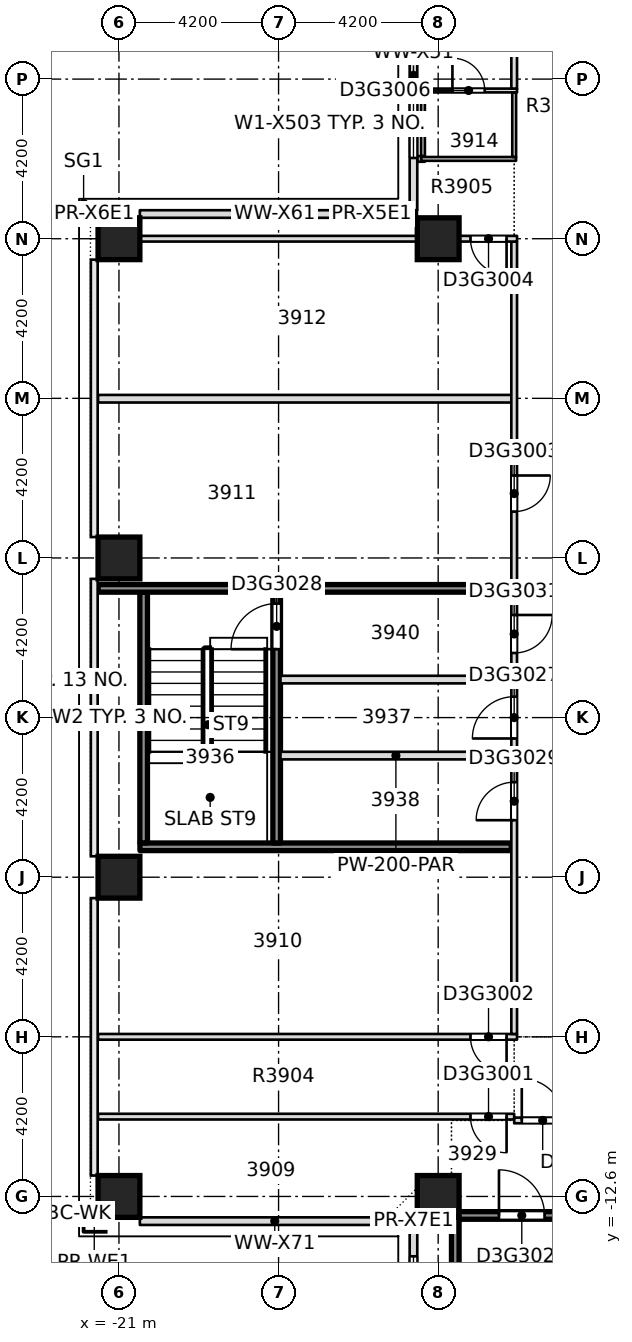
"""IFC4 building model, lengths in metres.
Left out: names, types, materials, properties, quantities, classifications, styles, units other than length and angle.
Written with IfcOpenShell. Run it as: python <this file> out.ifc"""

import sys

from ifc_helpers import new_model, si_unit, direction, frame, frame_2d, origin, origin_2d, place, context, subcontext, project, spatial, rectangle, extrude, element, fill, save


model = new_model("IFC4")
c1 = context("Model", 3, precision=1e-05, world=origin(), true_north=direction((0.0, 1.0)))
c2 = subcontext(c1, "Body", "Model", "MODEL_VIEW")
j1 = project(units=[si_unit("LENGTHUNIT", "METRE"), si_unit("PLANEANGLEUNIT", "RADIAN")], contexts=[c1])
p1 = place(None, origin())
s1 = spatial("IfcSite", under=j1, at=p1, CompositionType="ELEMENT")
p2 = place(p1, origin())
s2 = spatial("IfcBuilding", under=s1, at=p2, CompositionType="ELEMENT")
p3 = place(p2, frame((0.0, 0.0, 153.8)))
s3 = spatial("IfcBuildingStorey", under=s2, at=p3, CompositionType="ELEMENT", Elevation=153.8)
for number, where, z_axis, x_axis in (
    (1, (-21.0, -12.6, -0.4), (0.0, 0.0, 1.0), (1.0, 0.0, 0.0)),
    (2, (-12.6, -12.6, -0.4), (0.0, 0.0, 1.0), (1.0, 0.0, 0.0)),
    (3, (-21.0, -4.2, -0.4), (0.0, 0.0, 1.0), (1.0, 0.0, 0.0)),
    (4, (-21.0, 4.2, -0.4), (0.0, 0.0, 1.0), (1.0, 0.0, 0.0)),
    (5, (-21.0, 12.6, -0.4), (0.0, 0.0, 1.0), (1.0, 0.0, 0.0)),
    (6, (-12.6, 12.6, -0.4), (0.0, 0.0, 1.0), (1.0, 0.0, 0.0)),
):
    element("IfcColumn", number, at=place(p3, frame(where, z_axis=z_axis, x_axis=x_axis)), inside=s3, PredefinedType="COLUMN", context=c2, shape_type="SweptSolid", body=[
        extrude(rectangle(XDim=1.1, YDim=1.1, at=origin_2d()), origin(), (0.0, 0.0, 1.0), 3.45),
    ])
p4 = place(p3, frame((-12.15, -13.1, 0.0), z_axis=(0.0, 0.0, 1.0), x_axis=(1.0, 0.0, 0.0)))
e7 = element("IfcWall", 7, at=p4, inside=s3, PredefinedType="SOLIDWALL", context=c2, shape_type="SweptSolid", body=[
    extrude(rectangle(XDim=3.498, YDim=0.2, at=frame_2d((1.749, 0.0))), origin(), (0.0, 0.0, 1.0), 3.05),
])
p5 = place(p4, frame((1.15, 0.0, 0.0)))
e8 = element("IfcOpeningElement", 8, at=p5, cuts=e7, PredefinedType="OPENING", context=c2, shape_type="SweptSolid", body=[
    extrude(rectangle(XDim=1.2, YDim=2.1, at=frame_2d((0.6, 1.05))), frame((0.0, 0.11, 0.0), z_axis=(0.0, -1.0, 0.0), x_axis=(1.0, 0.0, 0.0)), (0.0, 0.0, 1.0), 0.22),
])
p6 = place(p3, frame((-10.6, -10.6, 0.0), z_axis=(0.0, 0.0, 1.0), x_axis=(1.0, 0.0, 0.0)))
e9 = element("IfcWall", 9, at=p6, inside=s3, PredefinedType="PARTITIONING", context=c2, shape_type="SweptSolid", body=[
    extrude(rectangle(XDim=6.1, YDim=0.15, at=frame_2d((3.05, 0.0))), origin(), (0.0, 0.0, 1.0), 3.05),
])
p7 = place(p6, frame((3.575, 0.0, 0.0)))
e10 = element("IfcOpeningElement", 10, at=p7, cuts=e9, PredefinedType="OPENING", context=c2, shape_type="SweptSolid", body=[
    extrude(rectangle(XDim=0.95, YDim=2.1, at=frame_2d((0.475, 1.05))), frame((0.0, 0.085, 0.0), z_axis=(0.0, -1.0, 0.0), x_axis=(1.0, 0.0, 0.0)), (0.0, 0.0, 1.0), 0.17),
])
p8 = place(p6, frame((0.2, 0.0, 0.0)))
e11 = element("IfcOpeningElement", 11, at=p8, cuts=e9, PredefinedType="OPENING", context=c2, shape_type="SweptSolid", body=[
    extrude(rectangle(XDim=1.1, YDim=2.1, at=frame_2d((0.55, 1.05))), frame((0.0, 0.085, 0.0), z_axis=(0.0, -1.0, 0.0), x_axis=(1.0, 0.0, 0.0)), (0.0, 0.0, 1.0), 0.17),
])
p9 = place(p3, frame((-21.55, -10.5, 0.0), z_axis=(0.0, 0.0, 1.0), x_axis=(1.0, 0.0, 0.0)))
e12 = element("IfcWall", 12, at=p9, inside=s3, PredefinedType="PARTITIONING", context=c2, shape_type="SweptSolid", body=[
    extrude(rectangle(XDim=10.95, YDim=0.15, at=frame_2d((5.475, 0.0))), origin(), (0.0, 0.0, 1.0), 3.05),
])
p10 = place(p9, frame((9.8, 0.0, 0.0)))
e13 = element("IfcOpeningElement", 13, at=p10, cuts=e12, PredefinedType="OPENING", context=c2, shape_type="SweptSolid", body=[
    extrude(rectangle(XDim=0.95, YDim=2.1, at=frame_2d((0.475, 1.05))), frame((0.0, 0.085, 0.0), z_axis=(0.0, -1.0, 0.0), x_axis=(1.0, 0.0, 0.0)), (0.0, 0.0, 1.0), 0.17),
])
p11 = place(p3, frame((-21.55, -8.4, 0.0), z_axis=(0.0, 0.0, 1.0), x_axis=(1.0, 0.0, 0.0)))
e14 = element("IfcWall", 14, at=p11, inside=s3, PredefinedType="PARTITIONING", context=c2, shape_type="SweptSolid", body=[
    extrude(rectangle(XDim=11.025, YDim=0.15, at=frame_2d((5.513, 0.0))), origin(), (0.0, 0.0, 1.0), 3.05),
])
p12 = place(p11, frame((9.8, 0.0, 0.0)))
e15 = element("IfcOpeningElement", 15, at=p12, cuts=e14, PredefinedType="OPENING", context=c2, shape_type="SweptSolid", body=[
    extrude(rectangle(XDim=0.95, YDim=2.1, at=frame_2d((0.475, 1.05))), frame((0.0, 0.085, 0.0), z_axis=(0.0, -1.0, 0.0), x_axis=(1.0, 0.0, 0.0)), (0.0, 0.0, 1.0), 0.17),
])
p13 = place(p3, frame((-20.448, -3.4, 0.0), z_axis=(0.0, 0.0, 1.0), x_axis=(1.0, 0.0, 0.0)))
e16 = element("IfcWall", 16, at=p13, inside=s3, PredefinedType="SOLIDWALL", context=c2, shape_type="SweptSolid", body=[
    extrude(rectangle(XDim=9.773, YDim=0.2, at=frame_2d((4.886, 0.0))), origin(), (0.0, 0.0, 1.0), 3.05),
])
for number, where, z_axis, x_axis in (
    (17, (-16.75, -1.0, 0.0), (0.0, 0.0, 1.0), (1.0, 0.0, 0.0)),
    (18, (-16.75, 1.0, 0.0), (0.0, 0.0, 1.0), (1.0, 0.0, 0.0)),
):
    element("IfcWall", number, at=place(p3, frame(where, z_axis=z_axis, x_axis=x_axis)), inside=s3, PredefinedType="PARTITIONING", context=c2, shape_type="SweptSolid", body=[
        extrude(rectangle(XDim=6.075, YDim=0.2, at=frame_2d((3.038, 0.0))), origin(), (0.0, 0.0, 1.0), 3.05),
    ])
p14 = place(p3, frame((-21.55, 8.39, 0.0), z_axis=(0.0, 0.0, 1.0), x_axis=(1.0, 0.0, 0.0)))
e19 = element("IfcWall", 19, at=p14, inside=s3, PredefinedType="PARTITIONING", context=c2, shape_type="SweptSolid", body=[
    extrude(rectangle(XDim=10.875, YDim=0.2, at=frame_2d((5.438, 0.0))), origin(), (0.0, 0.0, 1.0), 3.05),
])
p15 = place(p3, frame((-21.55, 12.6, 0.0), z_axis=(0.0, 0.0, 1.0), x_axis=(1.0, 0.0, 0.0)))
e20 = element("IfcWall", 20, at=p15, inside=s3, PredefinedType="PARTITIONING", context=c2, shape_type="SweptSolid", body=[
    extrude(rectangle(XDim=1.1, YDim=0.15, at=frame_2d((0.55, 0.0))), origin(), (0.0, 0.0, 1.0), 3.05),
])
p16 = place(p3, frame((-13.15, 14.7, 0.0), z_axis=(0.0, 0.0, 1.0), x_axis=(1.0, 0.0, 0.0)))
e21 = element("IfcWall", 21, at=p16, inside=s3, PredefinedType="PARTITIONING", context=c2, shape_type="SweptSolid", body=[
    extrude(rectangle(XDim=0.2, YDim=0.15, at=frame_2d((0.1, 0.0))), origin(), (0.0, 0.0, 1.0), 3.05),
])
p17 = place(p3, frame((-13.05, 14.7, 0.0), z_axis=(0.0, 0.0, 1.0), x_axis=(1.0, 0.0, 0.0)))
e22 = element("IfcWall", 22, at=p17, inside=s3, PredefinedType="PARTITIONING", context=c2, shape_type="SweptSolid", body=[
    extrude(rectangle(XDim=2.5, YDim=0.1, at=frame_2d((1.25, 0.0))), origin(), (0.0, 0.0, 1.0), 3.05),
])
p18 = place(p3, frame((-13.05, 16.5, 0.0), z_axis=(0.0, 0.0, 1.0), x_axis=(1.0, 0.0, 0.0)))
e23 = element("IfcWall", 23, at=p18, inside=s3, PredefinedType="PARTITIONING", context=c2, shape_type="SweptSolid", body=[
    extrude(rectangle(XDim=2.525, YDim=0.1, at=frame_2d((1.263, 0.0))), origin(), (0.0, 0.0, 1.0), 3.05),
])
p19 = place(p18, frame((0.825, 0.0, 0.0)))
e24 = element("IfcOpeningElement", 24, at=p19, cuts=e23, PredefinedType="OPENING", context=c2, shape_type="SweptSolid", body=[
    extrude(rectangle(XDim=0.85, YDim=2.1, at=frame_2d((0.425, 1.05))), frame((0.0, 0.06, 0.0), z_axis=(0.0, -1.0, 0.0), x_axis=(1.0, 0.0, 0.0)), (0.0, 0.0, 1.0), 0.12),
])
p20 = place(p3, frame((-20.35, -3.298, 0.0), z_axis=(0.0, 0.0, 1.0), x_axis=(0.0, 1.0, 0.0)))
e25 = element("IfcWall", 25, at=p20, inside=s3, PredefinedType="SOLIDWALL", context=c2, shape_type="SweptSolid", body=[
    extrude(rectangle(XDim=6.596, YDim=0.2, at=frame_2d((3.298, 0.0))), origin(), (0.0, 0.0, 1.0), 3.05),
])
p21 = place(p3, frame((-16.85, -3.3, 0.0), z_axis=(0.0, 0.0, 1.0), x_axis=(0.0, 1.0, 0.0)))
e26 = element("IfcWall", 26, at=p21, inside=s3, PredefinedType="SOLIDWALL", context=c2, shape_type="SweptSolid", body=[
    extrude(rectangle(XDim=6.6, YDim=0.2, at=frame_2d((3.3, 0.0))), origin(), (0.0, 0.0, 1.0), 3.05),
])
p22 = place(p21, frame((5.1, 0.0, 0.0)))
e27 = element("IfcOpeningElement", 27, at=p22, cuts=e26, PredefinedType="OPENING", context=c2, shape_type="SweptSolid", body=[
    extrude(rectangle(XDim=1.2, YDim=2.1, at=frame_2d((0.6, 1.05))), frame((0.0, 0.11, 0.0), z_axis=(0.0, -1.0, 0.0), x_axis=(1.0, 0.0, 0.0)), (0.0, 0.0, 1.0), 0.22),
])
p23 = place(p3, frame((-13.0, 14.775, 0.0), z_axis=(0.0, 0.0, 1.0), x_axis=(0.0, 1.0, 0.0)))
e28 = element("IfcWall", 28, at=p23, inside=s3, PredefinedType="PARTITIONING", context=c2, shape_type="SweptSolid", body=[
    extrude(rectangle(XDim=1.675, YDim=0.1, at=frame_2d((0.837, 0.0))), origin(), (0.0, 0.0, 1.0), 3.05),
])
p24 = place(p3, frame((-10.6, -8.325, 0.0), z_axis=(0.0, 0.0, 1.0), x_axis=(0.0, 1.0, 0.0)))
e29 = element("IfcWall", 29, at=p24, inside=s3, PredefinedType="PARTITIONING", context=c2, shape_type="SweptSolid", body=[
    extrude(rectangle(XDim=20.85, YDim=0.15, at=frame_2d((10.425, 0.0))), origin(), (0.0, 0.0, 1.0), 3.05),
])
p25 = place(p24, frame((13.745, 0.0, 0.0)))
e30 = element("IfcOpeningElement", 30, at=p25, cuts=e29, PredefinedType="OPENING", context=c2, shape_type="SweptSolid", body=[
    extrude(rectangle(XDim=0.95, YDim=2.1, at=frame_2d((0.475, 1.05))), frame((0.0, 0.085, 0.0), z_axis=(0.0, -1.0, 0.0), x_axis=(1.0, 0.0, 0.0)), (0.0, 0.0, 1.0), 0.17),
])
p26 = place(p24, frame((7.775, 0.0, 0.0)))
e31 = element("IfcOpeningElement", 31, at=p26, cuts=e29, PredefinedType="OPENING", context=c2, shape_type="SweptSolid", body=[
    extrude(rectangle(XDim=1.1, YDim=2.1, at=frame_2d((0.55, 1.05))), frame((0.0, 0.085, 0.0), z_axis=(0.0, -1.0, 0.0), x_axis=(1.0, 0.0, 0.0)), (0.0, 0.0, 1.0), 0.17),
])
p27 = place(p24, frame((5.625, 0.0, 0.0)))
e32 = element("IfcOpeningElement", 32, at=p27, cuts=e29, PredefinedType="OPENING", context=c2, shape_type="SweptSolid", body=[
    extrude(rectangle(XDim=1.0, YDim=2.1, at=frame_2d((0.5, 1.05))), frame((0.0, 0.085, 0.0), z_axis=(0.0, -1.0, 0.0), x_axis=(1.0, 0.0, 0.0)), (0.0, 0.0, 1.0), 0.17),
])
p28 = place(p24, frame((10.025, 0.0, 0.0)))
e33 = element("IfcOpeningElement", 33, at=p28, cuts=e29, PredefinedType="OPENING", context=c2, shape_type="SweptSolid", body=[
    extrude(rectangle(XDim=1.0, YDim=2.1, at=frame_2d((0.5, 1.05))), frame((0.0, 0.085, 0.0), z_axis=(0.0, -1.0, 0.0), x_axis=(1.0, 0.0, 0.0)), (0.0, 0.0, 1.0), 0.17),
])
p29 = place(p3, frame((-10.6, 14.75, 0.0), z_axis=(0.0, 0.0, 1.0), x_axis=(0.0, 1.0, 0.0)))
e34 = element("IfcWall", 34, at=p29, inside=s3, PredefinedType="PARTITIONING", context=c2, shape_type="SweptSolid", body=[
    extrude(rectangle(XDim=1.7, YDim=0.1, at=frame_2d((0.85, 0.0))), origin(), (0.0, 0.0, 1.0), 3.05),
])
p30 = place(p3, frame((-10.6, 16.55, 0.0), z_axis=(0.0, 0.0, 1.0), x_axis=(0.0, 1.0, 0.0)))
e35 = element("IfcWall", 35, at=p30, inside=s3, PredefinedType="PARTITIONING", context=c2, shape_type="SweptSolid", body=[
    extrude(rectangle(XDim=5.0, YDim=0.15, at=frame_2d((2.5, 0.0))), origin(), (0.0, 0.0, 1.0), 3.05),
])
p31 = place(p30, frame((1.8, 0.0, 0.0)))
e36 = element("IfcOpeningElement", 36, at=p31, cuts=e35, PredefinedType="OPENING", context=c2, shape_type="SweptSolid", body=[
    extrude(rectangle(XDim=0.95, YDim=2.1, at=frame_2d((0.475, 1.05))), frame((0.0, 0.085, 0.0), z_axis=(0.0, -1.0, 0.0), x_axis=(1.0, 0.0, 0.0)), (0.0, 0.0, 1.0), 0.17),
])
p32 = place(p3, frame((-13.25, 20.45, 0.0), z_axis=(0.0, 0.0, 1.0), x_axis=(0.0, -1.0, 0.0)))
e37 = element("IfcWall", 37, at=p32, inside=s3, PredefinedType="STANDARD", context=c2, shape_type="SweptSolid", body=[
    extrude(rectangle(XDim=7.1, YDim=0.2, at=frame_2d((3.55, 0.0))), origin(), (0.0, 0.0, 1.0), 3.05),
])
p33 = place(p32, frame((3.925, 0.0, 0.2)))
e38 = element("IfcOpeningElement", 38, at=p33, cuts=e37, PredefinedType="OPENING", context=c2, shape_type="SweptSolid", body=[
    extrude(rectangle(XDim=1.8, YDim=2.65, at=frame_2d((0.9, 1.325))), frame((0.0, 0.11, 0.0), z_axis=(0.0, -1.0, 0.0), x_axis=(1.0, 0.0, 0.0)), (0.0, 0.0, 1.0), 0.22),
])
p34 = place(p32, frame((0.375, 0.0, 0.2)))
e39 = element("IfcOpeningElement", 39, at=p34, cuts=e37, PredefinedType="OPENING", context=c2, shape_type="SweptSolid", body=[
    extrude(rectangle(XDim=1.8, YDim=2.65, at=frame_2d((0.9, 1.325))), frame((0.0, 0.11, 0.0), z_axis=(0.0, -1.0, 0.0), x_axis=(1.0, 0.0, 0.0)), (0.0, 0.0, 1.0), 0.22),
])
for number, where, z_axis, x_axis in (
    (40, (-13.35, 13.25, 0.0), (0.0, 0.0, 1.0), (-1.0, 0.0, 0.0)),
    (41, (-20.45, -13.25, 0.0), (0.0, 0.0, 1.0), (1.0, 0.0, 0.0)),
):
    element("IfcWall", number, at=place(p3, frame(where, z_axis=z_axis, x_axis=x_axis)), inside=s3, PredefinedType="STANDARD", context=c2, shape_type="SweptSolid", body=[
        extrude(rectangle(XDim=7.1, YDim=0.2, at=frame_2d((3.55, 0.0))), origin(), (0.0, 0.0, 1.0), 3.05),
    ])
p35 = place(p3, frame((-13.25, -13.35, 0.0), z_axis=(0.0, 0.0, 1.0), x_axis=(0.0, -1.0, 0.0)))
e42 = element("IfcWall", 42, at=p35, inside=s3, PredefinedType="STANDARD", context=c2, shape_type="SweptSolid", body=[
    extrude(rectangle(XDim=7.1, YDim=0.2, at=frame_2d((3.55, 0.0))), origin(), (0.0, 0.0, 1.0), 3.05),
])
p36 = place(p35, frame((4.375, 0.0, 0.2)))
e43 = element("IfcOpeningElement", 43, at=p36, cuts=e42, PredefinedType="OPENING", context=c2, shape_type="SweptSolid", body=[
    extrude(rectangle(XDim=1.8, YDim=2.65, at=frame_2d((0.9, 1.325))), frame((0.0, 0.11, 0.0), z_axis=(0.0, -1.0, 0.0), x_axis=(1.0, 0.0, 0.0)), (0.0, 0.0, 1.0), 0.22),
])
p37 = place(p35, frame((0.825, 0.0, 0.2)))
e44 = element("IfcOpeningElement", 44, at=p37, cuts=e42, PredefinedType="OPENING", context=c2, shape_type="SweptSolid", body=[
    extrude(rectangle(XDim=1.8, YDim=2.65, at=frame_2d((0.9, 1.325))), frame((0.0, 0.11, 0.0), z_axis=(0.0, -1.0, 0.0), x_axis=(1.0, 0.0, 0.0)), (0.0, 0.0, 1.0), 0.22),
])
p38 = place(p3, frame((-12.15, -20.45, 0.0), z_axis=(0.0, 0.0, 1.0), x_axis=(0.0, 1.0, 0.0)))
e45 = element("IfcWall", 45, at=p38, inside=s3, PredefinedType="SOLIDWALL", context=c2, shape_type="SweptSolid", body=[
    extrude(rectangle(XDim=7.3, YDim=0.2, at=frame_2d((3.65, 0.0))), origin(), (0.0, 0.0, 1.0), 3.05),
])
p39 = place(p3, frame((-21.55, 3.4, 0.0), z_axis=(0.0, 0.0, 1.0), x_axis=(1.0, 0.0, 0.0)))
e46 = element("IfcWall", 46, at=p39, inside=s3, PredefinedType="SOLIDWALL", context=c2, shape_type="SweptSolid", body=[
    extrude(rectangle(XDim=10.875, YDim=0.2, at=frame_2d((5.438, 0.0))), origin(), (0.0, 0.0, 1.0), 3.05),
])
p40 = place(p3, frame((-20.45, 12.6, 0.0), z_axis=(0.0, 0.0, 1.0), x_axis=(1.0, 0.0, 0.0)))
e47 = element("IfcWall", 47, at=p40, inside=s3, PredefinedType="PARTITIONING", context=c2, shape_type="SweptSolid", body=[
    extrude(rectangle(XDim=7.3, YDim=0.15, at=frame_2d((3.65, 0.0))), origin(), (0.0, 0.0, 1.0), 2.5),
])
p41 = place(p3, frame((-13.15, 12.6, 0.0), z_axis=(0.0, 0.0, 1.0), x_axis=(1.0, 0.0, 0.0)))
e48 = element("IfcWall", 48, at=p41, inside=s3, PredefinedType="PARTITIONING", context=c2, shape_type="SweptSolid", body=[
    extrude(rectangle(XDim=2.625, YDim=0.15, at=frame_2d((1.312, 0.0))), origin(), (0.0, 0.0, 1.0), 3.05),
])
p42 = place(p41, frame((1.4, 0.0, 0.0)))
e49 = element("IfcOpeningElement", 49, at=p42, cuts=e48, PredefinedType="OPENING", context=c2, shape_type="SweptSolid", body=[
    extrude(rectangle(XDim=0.95, YDim=2.1, at=frame_2d((0.475, 1.05))), frame((0.0, 0.085, 0.0), z_axis=(0.0, -1.0, 0.0), x_axis=(1.0, 0.0, 0.0)), (0.0, 0.0, 1.0), 0.17),
])
p43 = place(p10, origin())
e50 = element("IfcDoor", 50, at=p43, inside=s3, OperationType="SINGLE_SWING_RIGHT", PredefinedType="DOOR", context=c2, shape_type="SweptSolid", body=[
    extrude(rectangle(XDim=0.95, YDim=2.1, at=frame_2d((0.475, 1.05))), frame((0.0, 0.025, 0.0), z_axis=(0.0, -1.0, 0.0), x_axis=(1.0, 0.0, 0.0)), (0.0, 0.0, 1.0), 0.05),
])
fill(e13, e50)
p44 = place(p12, origin())
e51 = element("IfcDoor", 51, at=p44, inside=s3, OperationType="SINGLE_SWING_LEFT", PredefinedType="DOOR", context=c2, shape_type="SweptSolid", body=[
    extrude(rectangle(XDim=0.95, YDim=2.1, at=frame_2d((0.475, 1.05))), frame((0.0, 0.025, 0.0), z_axis=(0.0, -1.0, 0.0), x_axis=(1.0, 0.0, 0.0)), (0.0, 0.0, 1.0), 0.05),
])
fill(e15, e51)
p45 = place(p25, origin())
e52 = element("IfcDoor", 52, at=p45, inside=s3, OperationType="SINGLE_SWING_LEFT", PredefinedType="DOOR", context=c2, shape_type="SweptSolid", body=[
    extrude(rectangle(XDim=0.95, YDim=2.1, at=frame_2d((0.475, 1.05))), frame((0.0, 0.025, 0.0), z_axis=(0.0, -1.0, 0.0), x_axis=(1.0, 0.0, 0.0)), (0.0, 0.0, 1.0), 0.05),
])
fill(e30, e52)
p46 = place(p42, origin())
e53 = element("IfcDoor", 53, at=p46, inside=s3, OperationType="SINGLE_SWING_RIGHT", PredefinedType="DOOR", context=c2, shape_type="SweptSolid", body=[
    extrude(rectangle(XDim=0.95, YDim=2.1, at=frame_2d((0.475, 1.05))), frame((0.0, 0.025, 0.0), z_axis=(0.0, -1.0, 0.0), x_axis=(1.0, 0.0, 0.0)), (0.0, 0.0, 1.0), 0.05),
])
fill(e49, e53)
p47 = place(p19, origin())
e54 = element("IfcDoor", 54, at=p47, inside=s3, OperationType="SINGLE_SWING_RIGHT", PredefinedType="DOOR", context=c2, shape_type="SweptSolid", body=[
    extrude(rectangle(XDim=0.85, YDim=2.1, at=frame_2d((0.425, 1.05))), frame((0.0, 0.025, 0.0), z_axis=(0.0, -1.0, 0.0), x_axis=(1.0, 0.0, 0.0)), (0.0, 0.0, 1.0), 0.05),
])
fill(e24, e54)
p48 = place(p8, origin())
e55 = element("IfcDoor", 55, at=p48, inside=s3, OperationType="SINGLE_SWING_RIGHT", PredefinedType="DOOR", context=c2, shape_type="SweptSolid", body=[
    extrude(rectangle(XDim=1.1, YDim=2.1, at=frame_2d((0.55, 1.05))), frame((0.0, 0.025, 0.0), z_axis=(0.0, -1.0, 0.0), x_axis=(1.0, 0.0, 0.0)), (0.0, 0.0, 1.0), 0.05),
])
fill(e11, e55)
p49 = place(p5, origin())
e56 = element("IfcDoor", 56, at=p49, inside=s3, OperationType="SINGLE_SWING_RIGHT", PredefinedType="DOOR", context=c2, shape_type="SweptSolid", body=[
    extrude(rectangle(XDim=1.2, YDim=2.1, at=frame_2d((0.6, 1.05))), frame((0.0, 0.025, 0.0), z_axis=(0.0, -1.0, 0.0), x_axis=(1.0, 0.0, 0.0)), (0.0, 0.0, 1.0), 0.05),
])
fill(e8, e56)
p50 = place(p26, origin())
e57 = element("IfcDoor", 57, at=p50, inside=s3, OperationType="SINGLE_SWING_LEFT", PredefinedType="DOOR", context=c2, shape_type="SweptSolid", body=[
    extrude(rectangle(XDim=1.1, YDim=2.1, at=frame_2d((0.55, 1.05))), frame((0.0, 0.025, 0.0), z_axis=(0.0, -1.0, 0.0), x_axis=(1.0, 0.0, 0.0)), (0.0, 0.0, 1.0), 0.05),
])
fill(e31, e57)
p51 = place(p22, origin())
e58 = element("IfcDoor", 58, at=p51, inside=s3, OperationType="SINGLE_SWING_RIGHT", PredefinedType="DOOR", context=c2, shape_type="SweptSolid", body=[
    extrude(rectangle(XDim=1.2, YDim=2.1, at=frame_2d((0.6, 1.05))), frame((0.0, 0.025, 0.0), z_axis=(0.0, -1.0, 0.0), x_axis=(1.0, 0.0, 0.0)), (0.0, 0.0, 1.0), 0.05),
])
fill(e27, e58)
p52 = place(p27, origin())
e59 = element("IfcDoor", 59, at=p52, inside=s3, OperationType="SINGLE_SWING_RIGHT", PredefinedType="DOOR", context=c2, shape_type="SweptSolid", body=[
    extrude(rectangle(XDim=1.0, YDim=2.1, at=frame_2d((0.5, 1.05))), frame((0.0, 0.025, 0.0), z_axis=(0.0, -1.0, 0.0), x_axis=(1.0, 0.0, 0.0)), (0.0, 0.0, 1.0), 0.05),
])
fill(e32, e59)
p53 = place(p28, origin())
e60 = element("IfcDoor", 60, at=p53, inside=s3, OperationType="SINGLE_SWING_LEFT", PredefinedType="DOOR", context=c2, shape_type="SweptSolid", body=[
    extrude(rectangle(XDim=1.0, YDim=2.1, at=frame_2d((0.5, 1.05))), frame((0.0, 0.025, 0.0), z_axis=(0.0, -1.0, 0.0), x_axis=(1.0, 0.0, 0.0)), (0.0, 0.0, 1.0), 0.05),
])
fill(e33, e60)
p54 = place(p33, origin())
e61 = element("IfcWindow", 61, at=p54, inside=s3, PartitioningType="SINGLE_PANEL", PredefinedType="WINDOW", context=c2, shape_type="SweptSolid", body=[
    extrude(rectangle(XDim=1.8, YDim=2.65, at=frame_2d((0.9, 1.325))), frame((0.0, 0.03, 0.0), z_axis=(0.0, -1.0, 0.0), x_axis=(1.0, 0.0, 0.0)), (0.0, 0.0, 1.0), 0.06),
])
fill(e38, e61)
p55 = place(p37, origin())
e62 = element("IfcWindow", 62, at=p55, inside=s3, PartitioningType="SINGLE_PANEL", PredefinedType="WINDOW", context=c2, shape_type="SweptSolid", body=[
    extrude(rectangle(XDim=1.8, YDim=2.65, at=frame_2d((0.9, 1.325))), frame((0.0, 0.03, 0.0), z_axis=(0.0, -1.0, 0.0), x_axis=(1.0, 0.0, 0.0)), (0.0, 0.0, 1.0), 0.06),
])
fill(e44, e62)
save(model, sys.argv[1])
